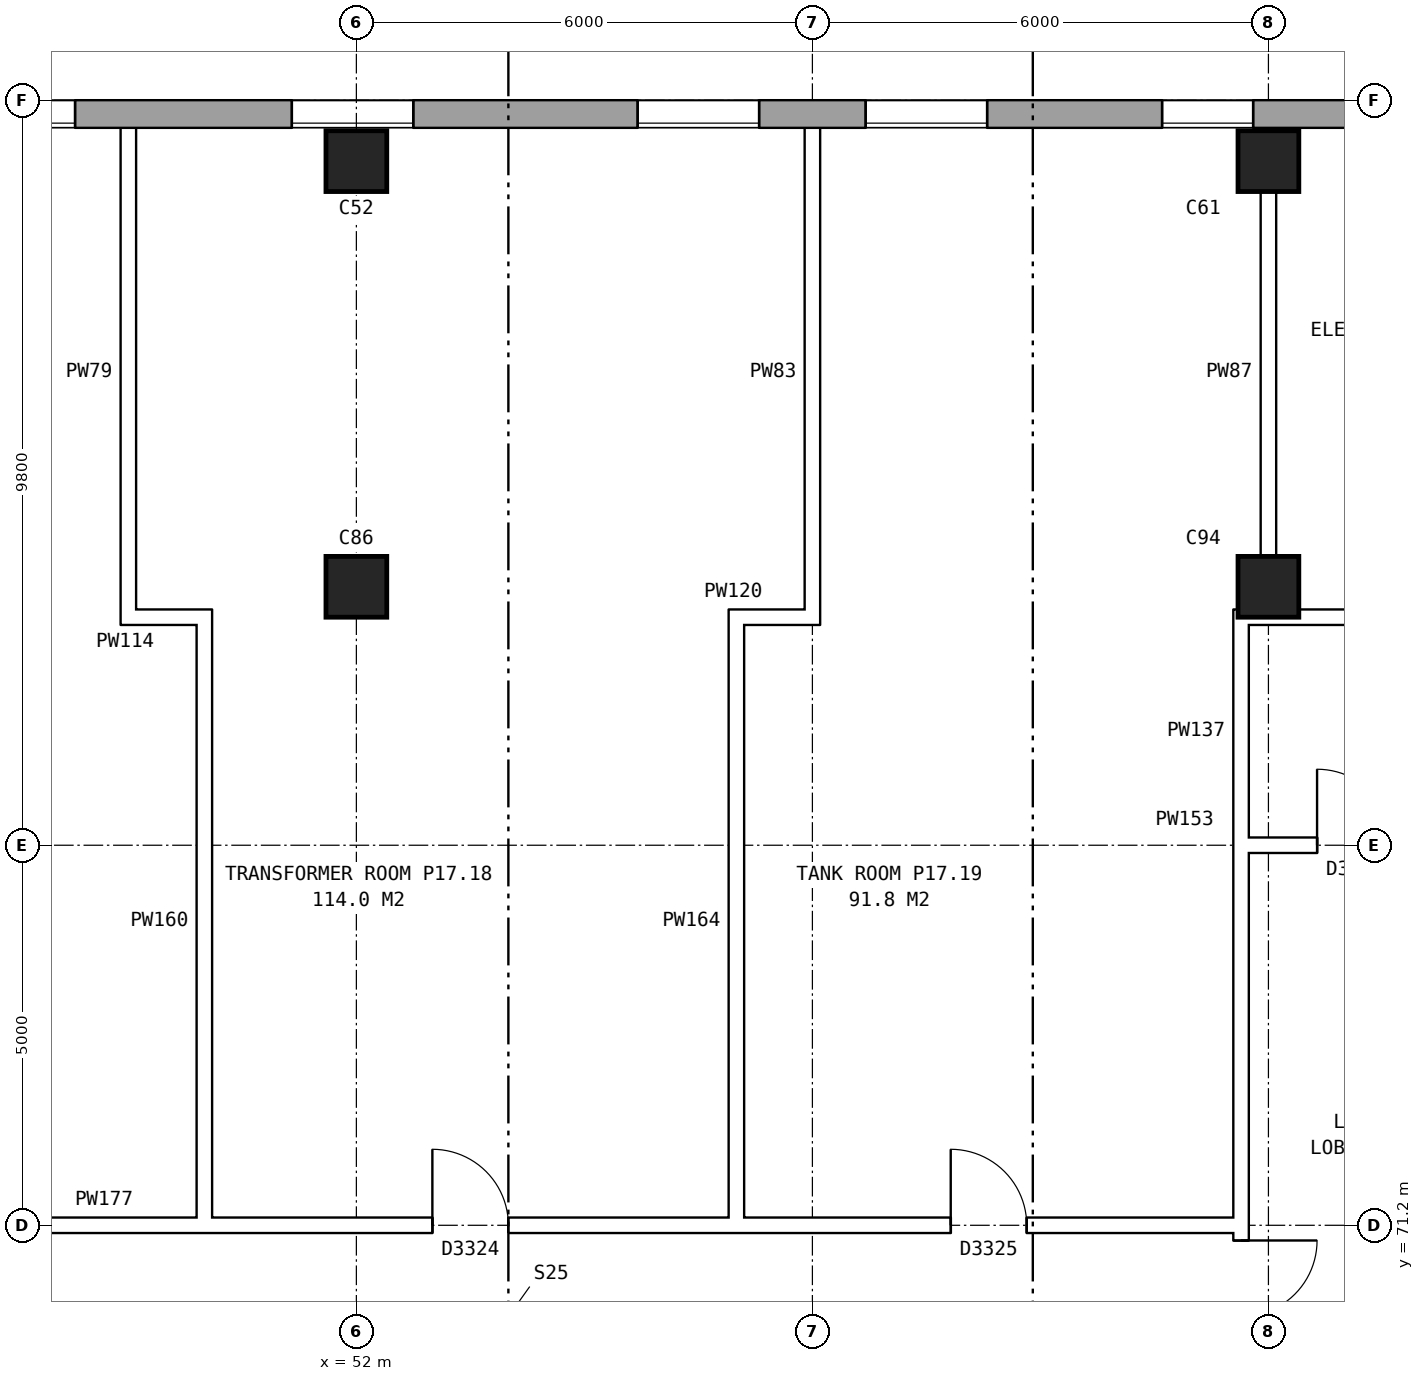
"""IFC4 building model, lengths in metres.
Left out: names, types, materials, properties, quantities, classifications, styles, units other than length and angle.
Written with IfcOpenShell. Run it as: python <this file> out.ifc"""

import sys

from ifc_helpers import new_model, si_unit, direction, frame, frame_2d, origin, origin_2d, place, context, subcontext, project, spatial, rectangle, extrude, element, fill, save


model = new_model("IFC4")
c1 = context("Model", 3, precision=1e-05, world=origin(), true_north=direction((0.0, 1.0)))
c2 = subcontext(c1, "Body", "Model", "MODEL_VIEW")
j1 = project(units=[si_unit("LENGTHUNIT", "METRE"), si_unit("PLANEANGLEUNIT", "RADIAN")], contexts=[c1])
p1 = place(None, origin())
s1 = spatial("IfcSite", under=j1, at=p1, CompositionType="ELEMENT")
p2 = place(p1, origin())
s2 = spatial("IfcBuilding", under=s1, at=p2, CompositionType="ELEMENT")
p3 = place(p2, frame((0.0, 0.0, 62.9)))
s3 = spatial("IfcBuildingStorey", under=s2, at=p3, CompositionType="ELEMENT", Elevation=62.9)
for number, where, z_axis, x_axis in (
    (1, (52.0, 79.6, 0.0), (0.0, 0.0, 1.0), (1.0, 0.0, 0.0)),
    (2, (52.0, 85.2, 0.0), (0.0, 0.0, 1.0), (1.0, 0.0, 0.0)),
    (3, (64.0, 79.6, 0.0), (0.0, 0.0, 1.0), (1.0, 0.0, 0.0)),
    (4, (64.0, 85.2, 0.0), (0.0, 0.0, 1.0), (1.0, 0.0, 0.0)),
):
    element("IfcColumn", number, at=place(p3, frame(where, z_axis=z_axis, x_axis=x_axis)), inside=s3, PredefinedType="COLUMN", context=c2, shape_type="SweptSolid", body=[
        extrude(rectangle(XDim=0.8, YDim=0.8, at=origin_2d()), origin(), (0.0, 0.0, 1.0), 4.2),
    ])
p4 = place(p3, frame((72.925, 85.82, 0.0), z_axis=(0.0, 0.0, 1.0), x_axis=(-1.0, 0.0, 0.0)))
e5 = element("IfcWall", 5, at=p4, inside=s3, PredefinedType="STANDARD", context=c2, shape_type="SweptSolid", body=[
    extrude(rectangle(XDim=46.601, YDim=0.36, at=frame_2d((23.3, 0.0))), origin(), (0.0, 0.0, 1.0), 4.2),
])
p5 = place(p4, frame((1.15, 0.0, 1.5)))
e6 = element("IfcOpeningElement", 6, at=p5, cuts=e5, PredefinedType="OPENING", context=c2, shape_type="SweptSolid", body=[
    extrude(rectangle(XDim=1.2, YDim=1.2, at=frame_2d((0.6, 0.6))), frame((0.0, 0.19, 0.0), z_axis=(0.0, -1.0, 0.0), x_axis=(1.0, 0.0, 0.0)), (0.0, 0.0, 1.0), 0.38),
])
p6 = place(p4, frame((3.625, 0.0, 1.5)))
e7 = element("IfcOpeningElement", 7, at=p6, cuts=e5, PredefinedType="OPENING", context=c2, shape_type="SweptSolid", body=[
    extrude(rectangle(XDim=1.6, YDim=1.2, at=frame_2d((0.8, 0.6))), frame((0.0, 0.19, 0.0), z_axis=(0.0, -1.0, 0.0), x_axis=(1.0, 0.0, 0.0)), (0.0, 0.0, 1.0), 0.38),
])
p7 = place(p4, frame((9.125, 0.0, 1.5)))
e8 = element("IfcOpeningElement", 8, at=p7, cuts=e5, PredefinedType="OPENING", context=c2, shape_type="SweptSolid", body=[
    extrude(rectangle(XDim=1.2, YDim=1.2, at=frame_2d((0.6, 0.6))), frame((0.0, 0.19, 0.0), z_axis=(0.0, -1.0, 0.0), x_axis=(1.0, 0.0, 0.0)), (0.0, 0.0, 1.0), 0.38),
])
p8 = place(p4, frame((12.625, 0.0, 1.5)))
e9 = element("IfcOpeningElement", 9, at=p8, cuts=e5, PredefinedType="OPENING", context=c2, shape_type="SweptSolid", body=[
    extrude(rectangle(XDim=1.6, YDim=1.2, at=frame_2d((0.8, 0.6))), frame((0.0, 0.19, 0.0), z_axis=(0.0, -1.0, 0.0), x_axis=(1.0, 0.0, 0.0)), (0.0, 0.0, 1.0), 0.38),
])
p9 = place(p4, frame((15.625, 0.0, 1.5)))
e10 = element("IfcOpeningElement", 10, at=p9, cuts=e5, PredefinedType="OPENING", context=c2, shape_type="SweptSolid", body=[
    extrude(rectangle(XDim=1.6, YDim=1.2, at=frame_2d((0.8, 0.6))), frame((0.0, 0.19, 0.0), z_axis=(0.0, -1.0, 0.0), x_axis=(1.0, 0.0, 0.0)), (0.0, 0.0, 1.0), 0.38),
])
p10 = place(p4, frame((20.175, 0.0, 1.5)))
e11 = element("IfcOpeningElement", 11, at=p10, cuts=e5, PredefinedType="OPENING", context=c2, shape_type="SweptSolid", body=[
    extrude(rectangle(XDim=1.6, YDim=1.2, at=frame_2d((0.8, 0.6))), frame((0.0, 0.19, 0.0), z_axis=(0.0, -1.0, 0.0), x_axis=(1.0, 0.0, 0.0)), (0.0, 0.0, 1.0), 0.38),
])
p11 = place(p4, frame((24.625, 0.0, 1.5)))
e12 = element("IfcOpeningElement", 12, at=p11, cuts=e5, PredefinedType="OPENING", context=c2, shape_type="SweptSolid", body=[
    extrude(rectangle(XDim=1.6, YDim=1.2, at=frame_2d((0.8, 0.6))), frame((0.0, 0.19, 0.0), z_axis=(0.0, -1.0, 0.0), x_axis=(1.0, 0.0, 0.0)), (0.0, 0.0, 1.0), 0.38),
])
p12 = place(p4, frame((27.625, 0.0, 1.5)))
e13 = element("IfcOpeningElement", 13, at=p12, cuts=e5, PredefinedType="OPENING", context=c2, shape_type="SweptSolid", body=[
    extrude(rectangle(XDim=1.6, YDim=1.2, at=frame_2d((0.8, 0.6))), frame((0.0, 0.19, 0.0), z_axis=(0.0, -1.0, 0.0), x_axis=(1.0, 0.0, 0.0)), (0.0, 0.0, 1.0), 0.38),
])
p13 = place(p4, frame((32.025, 0.0, 1.5)))
e14 = element("IfcOpeningElement", 14, at=p13, cuts=e5, PredefinedType="OPENING", context=c2, shape_type="SweptSolid", body=[
    extrude(rectangle(XDim=0.6, YDim=1.2, at=frame_2d((0.3, 0.6))), frame((0.0, 0.19, 0.0), z_axis=(0.0, -1.0, 0.0), x_axis=(1.0, 0.0, 0.0)), (0.0, 0.0, 1.0), 0.38),
])
p14 = place(p4, frame((33.125, 0.0, 1.5)))
e15 = element("IfcOpeningElement", 15, at=p14, cuts=e5, PredefinedType="OPENING", context=c2, shape_type="SweptSolid", body=[
    extrude(rectangle(XDim=0.9, YDim=1.2, at=frame_2d((0.45, 0.6))), frame((0.0, 0.19, 0.0), z_axis=(0.0, -1.0, 0.0), x_axis=(1.0, 0.0, 0.0)), (0.0, 0.0, 1.0), 0.38),
])
p15 = place(p4, frame((36.625, 0.0, 1.5)))
e16 = element("IfcOpeningElement", 16, at=p15, cuts=e5, PredefinedType="OPENING", context=c2, shape_type="SweptSolid", body=[
    extrude(rectangle(XDim=1.6, YDim=1.2, at=frame_2d((0.8, 0.6))), frame((0.0, 0.19, 0.0), z_axis=(0.0, -1.0, 0.0), x_axis=(1.0, 0.0, 0.0)), (0.0, 0.0, 1.0), 0.38),
])
p16 = place(p4, frame((39.625, 0.0, 1.5)))
e17 = element("IfcOpeningElement", 17, at=p16, cuts=e5, PredefinedType="OPENING", context=c2, shape_type="SweptSolid", body=[
    extrude(rectangle(XDim=1.6, YDim=1.2, at=frame_2d((0.8, 0.6))), frame((0.0, 0.19, 0.0), z_axis=(0.0, -1.0, 0.0), x_axis=(1.0, 0.0, 0.0)), (0.0, 0.0, 1.0), 0.38),
])
p17 = place(p4, frame((43.925, 0.0, 1.5)))
e18 = element("IfcOpeningElement", 18, at=p17, cuts=e5, PredefinedType="OPENING", context=c2, shape_type="SweptSolid", body=[
    extrude(rectangle(XDim=0.6, YDim=1.2, at=frame_2d((0.3, 0.6))), frame((0.0, 0.19, 0.0), z_axis=(0.0, -1.0, 0.0), x_axis=(1.0, 0.0, 0.0)), (0.0, 0.0, 1.0), 0.38),
])
p18 = place(p3, frame((63.64, 63.9, 0.0), z_axis=(0.0, 0.0, 1.0), x_axis=(0.0, 1.0, 0.0)))
e19 = element("IfcWall", 19, at=p18, inside=s3, PredefinedType="PARTITIONING", context=c2, shape_type="SweptSolid", body=[
    extrude(rectangle(XDim=12.2, YDim=0.2, at=frame_2d((6.1, 0.0))), origin(), (0.0, 0.0, 1.0), 4.2),
])
p19 = place(p18, frame((5.1, 0.0, 0.0)))
e20 = element("IfcOpeningElement", 20, at=p19, cuts=e19, PredefinedType="OPENING", context=c2, shape_type="SweptSolid", body=[
    extrude(rectangle(XDim=2.0, YDim=2.1, at=frame_2d((1.0, 1.05))), frame((0.0, 0.11, 0.0), z_axis=(0.0, -1.0, 0.0), x_axis=(1.0, 0.0, 0.0)), (0.0, 0.0, 1.0), 0.22),
])
p20 = place(p3, frame((44.36, 71.2, 0.0), z_axis=(0.0, 0.0, 1.0), x_axis=(1.0, 0.0, 0.0)))
e21 = element("IfcWall", 21, at=p20, inside=s3, PredefinedType="PARTITIONING", context=c2, shape_type="SweptSolid", body=[
    extrude(rectangle(XDim=19.28, YDim=0.2, at=frame_2d((9.64, 0.0))), origin(), (0.0, 0.0, 1.0), 4.2),
])
p21 = place(p20, frame((8.64, 0.0, 0.0)))
e22 = element("IfcOpeningElement", 22, at=p21, cuts=e21, PredefinedType="OPENING", context=c2, shape_type="SweptSolid", body=[
    extrude(rectangle(XDim=1.0, YDim=2.1, at=frame_2d((0.5, 1.05))), frame((0.0, 0.11, 0.0), z_axis=(0.0, -1.0, 0.0), x_axis=(1.0, 0.0, 0.0)), (0.0, 0.0, 1.0), 0.22),
])
p22 = place(p20, frame((15.46, 0.0, 0.0)))
e23 = element("IfcOpeningElement", 23, at=p22, cuts=e21, PredefinedType="OPENING", context=c2, shape_type="SweptSolid", body=[
    extrude(rectangle(XDim=1.0, YDim=2.1, at=frame_2d((0.5, 1.05))), frame((0.0, 0.11, 0.0), z_axis=(0.0, -1.0, 0.0), x_axis=(1.0, 0.0, 0.0)), (0.0, 0.0, 1.0), 0.22),
])
p23 = place(p3, frame((63.54, 76.2, 0.0), z_axis=(0.0, 0.0, 1.0), x_axis=(1.0, 0.0, 0.0)))
e24 = element("IfcWall", 24, at=p23, inside=s3, PredefinedType="PARTITIONING", context=c2, shape_type="SweptSolid", body=[
    extrude(rectangle(XDim=3.1, YDim=0.2, at=frame_2d((1.55, 0.0))), origin(), (0.0, 0.0, 1.0), 4.2),
])
p24 = place(p23, frame((1.1, 0.0, 0.0)))
e25 = element("IfcOpeningElement", 25, at=p24, cuts=e24, PredefinedType="OPENING", context=c2, shape_type="SweptSolid", body=[
    extrude(rectangle(XDim=1.0, YDim=2.1, at=frame_2d((0.5, 1.05))), frame((0.0, 0.11, 0.0), z_axis=(0.0, -1.0, 0.0), x_axis=(1.0, 0.0, 0.0)), (0.0, 0.0, 1.0), 0.22),
])
for number, where, z_axis, x_axis in (
    (26, (48.9, 79.2, 0.0), (0.0, 0.0, 1.0), (1.0, 0.0, 0.0)),
    (27, (56.9, 79.2, 0.0), (0.0, 0.0, 1.0), (1.0, 0.0, 0.0)),
):
    element("IfcWall", number, at=place(p3, frame(where, z_axis=z_axis, x_axis=x_axis)), inside=s3, PredefinedType="PARTITIONING", context=c2, shape_type="SweptSolid", body=[
        extrude(rectangle(XDim=1.2, YDim=0.2, at=frame_2d((0.6, 0.0))), origin(), (0.0, 0.0, 1.0), 4.2),
    ])
p25 = place(p3, frame((63.54, 79.2, 0.0), z_axis=(0.0, 0.0, 1.0), x_axis=(1.0, 0.0, 0.0)))
e28 = element("IfcWall", 28, at=p25, inside=s3, PredefinedType="PARTITIONING", context=c2, shape_type="SweptSolid", body=[
    extrude(rectangle(XDim=12.22, YDim=0.2, at=frame_2d((6.11, 0.0))), origin(), (0.0, 0.0, 1.0), 4.2),
])
p26 = place(p25, frame((2.96, 0.0, 0.0)))
e29 = element("IfcOpeningElement", 29, at=p26, cuts=e28, PredefinedType="OPENING", context=c2, shape_type="SweptSolid", body=[
    extrude(rectangle(XDim=1.0, YDim=2.1, at=frame_2d((0.5, 1.05))), frame((0.0, 0.11, 0.0), z_axis=(0.0, -1.0, 0.0), x_axis=(1.0, 0.0, 0.0)), (0.0, 0.0, 1.0), 0.22),
])
p27 = place(p25, frame((8.78, 0.0, 0.0)))
e30 = element("IfcOpeningElement", 30, at=p27, cuts=e28, PredefinedType="OPENING", context=c2, shape_type="SweptSolid", body=[
    extrude(rectangle(XDim=1.0, YDim=2.1, at=frame_2d((0.5, 1.05))), frame((0.0, 0.11, 0.0), z_axis=(0.0, -1.0, 0.0), x_axis=(1.0, 0.0, 0.0)), (0.0, 0.0, 1.0), 0.22),
])
p28 = place(p3, frame((49.0, 79.1, 0.0), z_axis=(0.0, 0.0, 1.0), x_axis=(0.0, 1.0, 0.0)))
e31 = element("IfcWall", 31, at=p28, inside=s3, PredefinedType="PARTITIONING", context=c2, shape_type="SweptSolid", body=[
    extrude(rectangle(XDim=6.66, YDim=0.2, at=frame_2d((3.33, 0.0))), origin(), (0.0, 0.0, 1.0), 4.2),
])
for number, where, z_axis, x_axis in (
    (32, (50.0, 71.1, 0.0), (0.0, 0.0, 1.0), (0.0, 1.0, 0.0)),
    (33, (57.0, 71.1, 0.0), (0.0, 0.0, 1.0), (0.0, 1.0, 0.0)),
):
    element("IfcWall", number, at=place(p3, frame(where, z_axis=z_axis, x_axis=x_axis)), inside=s3, PredefinedType="PARTITIONING", context=c2, shape_type="SweptSolid", body=[
        extrude(rectangle(XDim=8.2, YDim=0.2, at=frame_2d((4.1, 0.0))), origin(), (0.0, 0.0, 1.0), 4.2),
    ])
p29 = place(p3, frame((58.0, 79.1, 0.0), z_axis=(0.0, 0.0, 1.0), x_axis=(0.0, 1.0, 0.0)))
e34 = element("IfcWall", 34, at=p29, inside=s3, PredefinedType="PARTITIONING", context=c2, shape_type="SweptSolid", body=[
    extrude(rectangle(XDim=6.66, YDim=0.2, at=frame_2d((3.33, 0.0))), origin(), (0.0, 0.0, 1.0), 4.2),
])
p30 = place(p3, frame((63.64, 76.1, 0.0), z_axis=(0.0, 0.0, 1.0), x_axis=(0.0, 1.0, 0.0)))
e35 = element("IfcWall", 35, at=p30, inside=s3, PredefinedType="PARTITIONING", context=c2, shape_type="SweptSolid", body=[
    extrude(rectangle(XDim=3.2, YDim=0.2, at=frame_2d((1.6, 0.0))), origin(), (0.0, 0.0, 1.0), 4.2),
])
p31 = place(p3, frame((64.0, 79.1, 0.0), z_axis=(0.0, 0.0, 1.0), x_axis=(0.0, 1.0, 0.0)))
e36 = element("IfcWall", 36, at=p31, inside=s3, PredefinedType="PARTITIONING", context=c2, shape_type="SweptSolid", body=[
    extrude(rectangle(XDim=6.66, YDim=0.2, at=frame_2d((3.33, 0.0))), origin(), (0.0, 0.0, 1.0), 4.2),
])
p32 = place(p7, origin())
e37 = element("IfcWindow", 37, at=p32, inside=s3, PartitioningType="DOUBLE_PANEL_HORIZONTAL", PredefinedType="WINDOW", context=c2, shape_type="SweptSolid", body=[
    extrude(rectangle(XDim=1.2, YDim=1.2, at=frame_2d((0.6, 0.6))), frame((0.0, 0.15, 0.0), z_axis=(0.0, -1.0, 0.0), x_axis=(1.0, 0.0, 0.0)), (0.0, 0.0, 1.0), 0.06),
])
fill(e8, e37)
p33 = place(p8, origin())
e38 = element("IfcWindow", 38, at=p33, inside=s3, PartitioningType="DOUBLE_PANEL_HORIZONTAL", PredefinedType="WINDOW", context=c2, shape_type="SweptSolid", body=[
    extrude(rectangle(XDim=1.6, YDim=1.2, at=frame_2d((0.8, 0.6))), frame((0.0, 0.15, 0.0), z_axis=(0.0, -1.0, 0.0), x_axis=(1.0, 0.0, 0.0)), (0.0, 0.0, 1.0), 0.06),
])
fill(e9, e38)
p34 = place(p9, origin())
e39 = element("IfcWindow", 39, at=p34, inside=s3, PartitioningType="DOUBLE_PANEL_HORIZONTAL", PredefinedType="WINDOW", context=c2, shape_type="SweptSolid", body=[
    extrude(rectangle(XDim=1.6, YDim=1.2, at=frame_2d((0.8, 0.6))), frame((0.0, 0.15, 0.0), z_axis=(0.0, -1.0, 0.0), x_axis=(1.0, 0.0, 0.0)), (0.0, 0.0, 1.0), 0.06),
])
fill(e10, e39)
p35 = place(p10, origin())
e40 = element("IfcWindow", 40, at=p35, inside=s3, PartitioningType="DOUBLE_PANEL_HORIZONTAL", PredefinedType="WINDOW", context=c2, shape_type="SweptSolid", body=[
    extrude(rectangle(XDim=1.6, YDim=1.2, at=frame_2d((0.8, 0.6))), frame((0.0, 0.15, 0.0), z_axis=(0.0, -1.0, 0.0), x_axis=(1.0, 0.0, 0.0)), (0.0, 0.0, 1.0), 0.06),
])
fill(e11, e40)
p36 = place(p11, origin())
e41 = element("IfcWindow", 41, at=p36, inside=s3, PartitioningType="DOUBLE_PANEL_HORIZONTAL", PredefinedType="WINDOW", context=c2, shape_type="SweptSolid", body=[
    extrude(rectangle(XDim=1.6, YDim=1.2, at=frame_2d((0.8, 0.6))), frame((0.0, 0.15, 0.0), z_axis=(0.0, -1.0, 0.0), x_axis=(1.0, 0.0, 0.0)), (0.0, 0.0, 1.0), 0.06),
])
fill(e12, e41)
p37 = place(p19, frame((2.0, 0.0, 0.0), z_axis=(0.0, 0.0, 1.0), x_axis=(-1.0, 0.0, 0.0)))
e42 = element("IfcDoor", 42, at=p37, inside=s3, OperationType="DOUBLE_DOOR_SINGLE_SWING", PredefinedType="DOOR", context=c2, shape_type="SweptSolid", body=[
    extrude(rectangle(XDim=2.0, YDim=2.1, at=frame_2d((1.0, 1.05))), frame((0.0, 0.025, 0.0), z_axis=(0.0, -1.0, 0.0), x_axis=(1.0, 0.0, 0.0)), (0.0, 0.0, 1.0), 0.05),
])
fill(e20, e42)
p38 = place(p21, origin())
e43 = element("IfcDoor", 43, at=p38, inside=s3, OperationType="SINGLE_SWING_LEFT", PredefinedType="DOOR", context=c2, shape_type="SweptSolid", body=[
    extrude(rectangle(XDim=1.0, YDim=2.1, at=frame_2d((0.5, 1.05))), frame((0.0, 0.025, 0.0), z_axis=(0.0, -1.0, 0.0), x_axis=(1.0, 0.0, 0.0)), (0.0, 0.0, 1.0), 0.05),
])
fill(e22, e43)
p39 = place(p22, origin())
e44 = element("IfcDoor", 44, at=p39, inside=s3, OperationType="SINGLE_SWING_LEFT", PredefinedType="DOOR", context=c2, shape_type="SweptSolid", body=[
    extrude(rectangle(XDim=1.0, YDim=2.1, at=frame_2d((0.5, 1.05))), frame((0.0, 0.025, 0.0), z_axis=(0.0, -1.0, 0.0), x_axis=(1.0, 0.0, 0.0)), (0.0, 0.0, 1.0), 0.05),
])
fill(e23, e44)
p40 = place(p24, origin())
e45 = element("IfcDoor", 45, at=p40, inside=s3, OperationType="SINGLE_SWING_LEFT", PredefinedType="DOOR", context=c2, shape_type="SweptSolid", body=[
    extrude(rectangle(XDim=1.0, YDim=2.1, at=frame_2d((0.5, 1.05))), frame((0.0, 0.025, 0.0), z_axis=(0.0, -1.0, 0.0), x_axis=(1.0, 0.0, 0.0)), (0.0, 0.0, 1.0), 0.05),
])
fill(e25, e45)
save(model, sys.argv[1])
